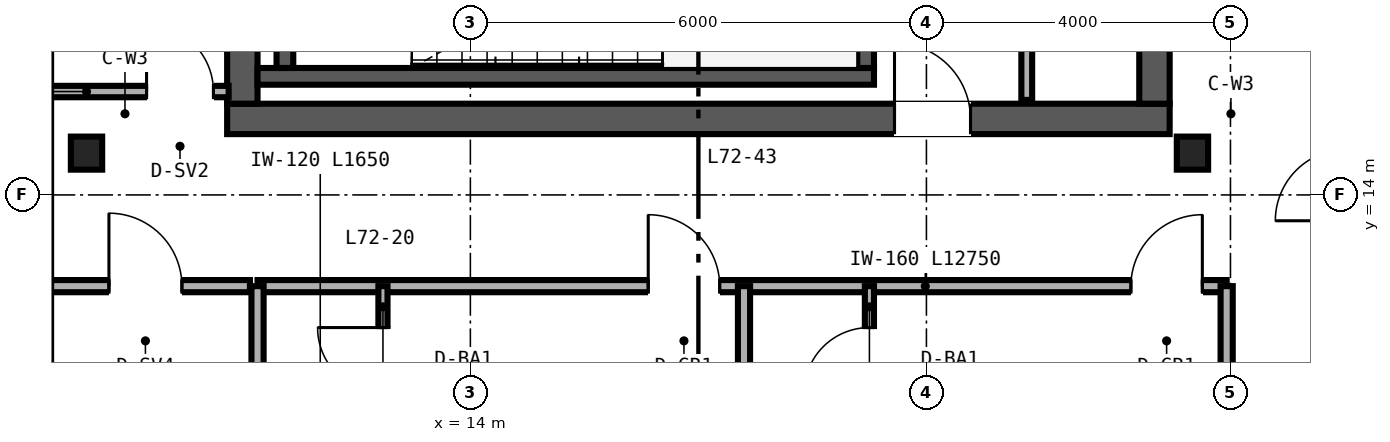
"""IFC4 building model, lengths in metres.
Left out: names, types, materials, properties, quantities, classifications, styles, units other than length and angle.
Written with IfcOpenShell. Run it as: python <this file> out.ifc"""

import sys

from ifc_helpers import new_model, si_unit, direction, frame, frame_2d, origin, origin_2d, place, context, subcontext, project, spatial, rectangle, i_section, extrude, source, transform, mapped, element, fill, save


model = new_model("IFC4")
c1 = context("Model", 3, precision=1e-05, world=origin(), true_north=direction((0.0, 1.0)))
c2 = subcontext(c1, "Body", "Model", "MODEL_VIEW")
j1 = project(units=[si_unit("LENGTHUNIT", "METRE"), si_unit("PLANEANGLEUNIT", "RADIAN")], contexts=[c1])
p1 = place(None, origin())
s1 = spatial("IfcSite", under=j1, at=p1, CompositionType="ELEMENT")
p2 = place(p1, origin())
s2 = spatial("IfcBuilding", under=s1, at=p2, CompositionType="ELEMENT")
p3 = place(p2, frame((0.0, 0.0, 283.2)))
s3 = spatial("IfcBuildingStorey", under=s2, at=p3, CompositionType="ELEMENT", Elevation=283.2)
p4 = place(p3, frame((10.8, 15.0, 0.0), z_axis=(0.0, 0.0, 1.0), x_axis=(1.0, 0.0, 0.0)))
e1 = element("IfcWall", 1, at=p4, inside=s3, PredefinedType="SHEAR", context=c2, shape_type="SweptSolid", body=[
    extrude(rectangle(XDim=12.4, YDim=0.4, at=frame_2d((6.2, 0.0))), origin(), (0.0, 0.0, 1.0), 3.38),
])
p5 = place(p4, frame((8.78, 0.0, 0.0)))
e2 = element("IfcOpeningElement", 2, at=p5, cuts=e1, PredefinedType="OPENING", context=c2, shape_type="SweptSolid", body=[
    extrude(rectangle(XDim=1.0, YDim=2.15, at=frame_2d((0.5, 1.075))), frame((0.0, 0.21, 0.0), z_axis=(0.0, -1.0, 0.0), x_axis=(1.0, 0.0, 0.0)), (0.0, 0.0, 1.0), 0.42),
])
for number, where, z_axis, x_axis in (
    (3, (11.0, 15.2, 0.0), (0.0, 0.0, 1.0), (0.0, 1.0, 0.0)),
    (4, (23.0, 15.2, 0.0), (0.0, 0.0, 1.0), (0.0, 1.0, 0.0)),
):
    element("IfcWall", number, at=place(p3, frame(where, z_axis=z_axis, x_axis=x_axis)), inside=s3, PredefinedType="SHEAR", context=c2, shape_type="SweptSolid", body=[
        extrude(rectangle(XDim=21.6, YDim=0.4, at=frame_2d((10.8, 0.0))), origin(), (0.0, 0.0, 1.0), 3.38),
    ])
p6 = place(p3, frame((11.2, 15.56, 0.0), z_axis=(0.0, 0.0, 1.0), x_axis=(1.0, 0.0, 0.0)))
e5 = element("IfcWall", 5, at=p6, inside=s3, PredefinedType="SHEAR", context=c2, shape_type="SweptSolid", body=[
    extrude(rectangle(XDim=8.11, YDim=0.22, at=frame_2d((4.055, 0.0))), origin(), (0.0, 0.0, 1.0), 3.4),
])
for number, where, z_axis, x_axis in (
    (6, (11.56, 15.67, 0.0), (0.0, 0.0, 1.0), (0.0, 1.0, 0.0)),
    (7, (19.2, 15.67, 0.0), (0.0, 0.0, 1.0), (0.0, 1.0, 0.0)),
):
    element("IfcWall", number, at=place(p3, frame(where, z_axis=z_axis, x_axis=x_axis)), inside=s3, PredefinedType="SHEAR", context=c2, shape_type="SweptSolid", body=[
        extrude(rectangle(XDim=3.28, YDim=0.22, at=frame_2d((1.64, 0.0))), origin(), (0.0, 0.0, 1.0), 3.4),
    ])
m1 = source(origin(), c2, "Body", "SweptSolid", [
    extrude(i_section(OverallWidth=0.412, OverallDepth=0.435, WebThickness=0.036, FlangeThickness=0.057, FilletRadius=0.025, at=origin_2d()), origin(), (0.0, 0.0, 1.0), 3.38),
])
for number, where, z_axis, x_axis in (
    (8, (8.95, 14.55, 0.0), (0.0, 0.0, 1.0), (1.0, 0.0, 0.0)),
    (9, (23.5, 14.55, 0.0), (0.0, 0.0, 1.0), (1.0, 0.0, 0.0)),
):
    element("IfcColumn", number, at=place(p3, frame(where, z_axis=z_axis, x_axis=x_axis)), inside=s3, PredefinedType="COLUMN", context=c2, shape_type="MappedRepresentation", body=[
        mapped(m1, transform((0.0, 0.0, 0.0), scale=1.0)),
    ])
p7 = place(p3, frame((21.32, 15.25, 0.0), z_axis=(0.0, 0.0, 1.0), x_axis=(0.0, 1.0, 0.0)))
e10 = element("IfcWall", 10, at=p7, inside=s3, PredefinedType="PARTITIONING", context=c2, shape_type="SweptSolid", body=[
    extrude(rectangle(XDim=3.59, YDim=0.142, at=frame_2d((1.795, 0.0))), origin(), (0.0, 0.0, 1.0), 3.38),
])
p8 = place(p7, frame((1.25, 0.0, 0.0)))
e11 = element("IfcOpeningElement", 11, at=p8, cuts=e10, PredefinedType="OPENING", context=c2, shape_type="SweptSolid", body=[
    extrude(rectangle(XDim=0.84, YDim=2.1, at=frame_2d((0.42, 1.05))), frame((0.0, 0.081, 0.0), z_axis=(0.0, -1.0, 0.0), x_axis=(1.0, 0.0, 0.0)), (0.0, 0.0, 1.0), 0.162),
])
p9 = place(p3, frame((11.2, 12.8, 0.0), z_axis=(0.0, 0.0, 1.0), x_axis=(1.0, 0.0, 0.0)))
e12 = element("IfcWall", 12, at=p9, inside=s3, PredefinedType="PARTITIONING", context=c2, shape_type="SweptSolid", body=[
    extrude(rectangle(XDim=12.75, YDim=0.16, at=frame_2d((6.375, 0.0))), origin(), (0.0, 0.0, 1.0), 3.38),
])
p10 = place(p9, frame((5.14, 0.0, 0.0)))
e13 = element("IfcOpeningElement", 13, at=p10, cuts=e12, PredefinedType="OPENING", context=c2, shape_type="SweptSolid", body=[
    extrude(rectangle(XDim=0.94, YDim=2.15, at=frame_2d((0.47, 1.075))), frame((0.0, 0.09, 0.0), z_axis=(0.0, -1.0, 0.0), x_axis=(1.0, 0.0, 0.0)), (0.0, 0.0, 1.0), 0.18),
])
p11 = place(p9, frame((11.49, 0.0, 0.0)))
e14 = element("IfcOpeningElement", 14, at=p11, cuts=e12, PredefinedType="OPENING", context=c2, shape_type="SweptSolid", body=[
    extrude(rectangle(XDim=0.94, YDim=2.15, at=frame_2d((0.47, 1.075))), frame((0.0, 0.09, 0.0), z_axis=(0.0, -1.0, 0.0), x_axis=(1.0, 0.0, 0.0)), (0.0, 0.0, 1.0), 0.18),
])
p12 = place(p3, frame((11.2, 9.26, 0.0), z_axis=(0.0, 0.0, 1.0), x_axis=(0.0, 1.0, 0.0)))
e15 = element("IfcWall", 15, at=p12, inside=s3, PredefinedType="PARTITIONING", context=c2, shape_type="SweptSolid", body=[
    extrude(rectangle(XDim=3.54, YDim=0.16, at=frame_2d((1.77, 0.0))), origin(), (0.0, 0.0, 1.0), 3.38),
])
p13 = place(p3, frame((23.95, 8.36, 0.0), z_axis=(0.0, 0.0, 1.0), x_axis=(0.0, 1.0, 0.0)))
e16 = element("IfcWall", 16, at=p13, inside=s3, PredefinedType="PARTITIONING", context=c2, shape_type="SweptSolid", body=[
    extrude(rectangle(XDim=4.44, YDim=0.16, at=frame_2d((2.22, 0.0))), origin(), (0.0, 0.0, 1.0), 3.38),
])
p14 = place(p3, frame((17.6, 8.36, 0.0), z_axis=(0.0, 0.0, 1.0), x_axis=(0.0, 1.0, 0.0)))
e17 = element("IfcWall", 17, at=p14, inside=s3, PredefinedType="PARTITIONING", context=c2, shape_type="SweptSolid", body=[
    extrude(rectangle(XDim=4.44, YDim=0.16, at=frame_2d((2.22, 0.0))), origin(), (0.0, 0.0, 1.0), 2.687),
])
p15 = place(p3, frame((12.85, 10.85, 0.0), z_axis=(0.0, 0.0, 1.0), x_axis=(0.0, 1.0, 0.0)))
e18 = element("IfcWall", 18, at=p15, inside=s3, PredefinedType="PARTITIONING", context=c2, shape_type="SweptSolid", body=[
    extrude(rectangle(XDim=1.95, YDim=0.12, at=frame_2d((0.975, 0.0))), origin(), (0.0, 0.0, 1.0), 3.38),
])
p16 = place(p15, frame((0.545, 0.0, 0.0)))
e19 = element("IfcOpeningElement", 19, at=p16, cuts=e18, PredefinedType="OPENING", context=c2, shape_type="SweptSolid", body=[
    extrude(rectangle(XDim=0.86, YDim=2.1, at=frame_2d((0.43, 1.05))), frame((0.0, 0.07, 0.0), z_axis=(0.0, -1.0, 0.0), x_axis=(1.0, 0.0, 0.0)), (0.0, 0.0, 1.0), 0.14),
])
p17 = place(p3, frame((19.25, 10.85, 0.0), z_axis=(0.0, 0.0, 1.0), x_axis=(0.0, 1.0, 0.0)))
e20 = element("IfcWall", 20, at=p17, inside=s3, PredefinedType="PARTITIONING", context=c2, shape_type="SweptSolid", body=[
    extrude(rectangle(XDim=1.95, YDim=0.12, at=frame_2d((0.975, 0.0))), origin(), (0.0, 0.0, 1.0), 3.38),
])
p18 = place(p17, frame((0.545, 0.0, 0.0)))
e21 = element("IfcOpeningElement", 21, at=p18, cuts=e20, PredefinedType="OPENING", context=c2, shape_type="SweptSolid", body=[
    extrude(rectangle(XDim=0.86, YDim=2.1, at=frame_2d((0.43, 1.05))), frame((0.0, 0.07, 0.0), z_axis=(0.0, -1.0, 0.0), x_axis=(1.0, 0.0, 0.0)), (0.0, 0.0, 1.0), 0.14),
])
p19 = place(p3, frame((8.16, 15.36, 0.0), z_axis=(0.0, 0.0, 1.0), x_axis=(1.0, 0.0, 0.0)))
e22 = element("IfcWall", 22, at=p19, inside=s3, PredefinedType="PARTITIONING", context=c2, shape_type="SweptSolid", body=[
    extrude(rectangle(XDim=2.66, YDim=0.15, at=frame_2d((1.33, 0.0))), origin(), (0.0, 0.0, 1.0), 2.601),
])
p20 = place(p19, frame((1.58, 0.0, 0.0)))
e23 = element("IfcOpeningElement", 23, at=p20, cuts=e22, PredefinedType="OPENING", context=c2, shape_type="SweptSolid", body=[
    extrude(rectangle(XDim=0.88, YDim=2.15, at=frame_2d((0.44, 1.075))), frame((0.0, 0.085, 0.0), z_axis=(0.0, -1.0, 0.0), x_axis=(1.0, 0.0, 0.0)), (0.0, 0.0, 1.0), 0.17),
])
p21 = place(p3, frame((8.35, 12.8, 0.0), z_axis=(0.0, 0.0, 1.0), x_axis=(1.0, 0.0, 0.0)))
e24 = element("IfcWall", 24, at=p21, inside=s3, PredefinedType="PARTITIONING", context=c2, shape_type="SweptSolid", body=[
    extrude(rectangle(XDim=2.75, YDim=0.16, at=frame_2d((1.375, 0.0))), origin(), (0.0, 0.0, 1.0), 3.38),
])
p22 = place(p21, frame((0.895, 0.0, 0.0)))
e25 = element("IfcOpeningElement", 25, at=p22, cuts=e24, PredefinedType="OPENING", context=c2, shape_type="SweptSolid", body=[
    extrude(rectangle(XDim=0.96, YDim=2.15, at=frame_2d((0.48, 1.075))), frame((0.0, 0.09, 0.0), z_axis=(0.0, -1.0, 0.0), x_axis=(1.0, 0.0, 0.0)), (0.0, 0.0, 1.0), 0.18),
])
m2 = source(origin(), c2, "Body", "SweptSolid", [
    extrude(rectangle(XDim=1.0, YDim=2.15, at=frame_2d((0.5, 1.075))), frame((0.0, 0.025, 0.0), z_axis=(0.0, -1.0, 0.0), x_axis=(1.0, 0.0, 0.0)), (0.0, 0.0, 1.0), 0.05),
])
p23 = place(p5, origin())
e26 = element("IfcDoor", 26, at=p23, inside=s3, OperationType="SINGLE_SWING_LEFT", PredefinedType="DOOR", context=c2, shape_type="MappedRepresentation", body=[
    mapped(m2, transform((0.0, 0.0, 0.0), scale=1.0)),
])
fill(e2, e26)
m3 = source(origin(), c2, "Body", "SweptSolid", [
    extrude(rectangle(XDim=0.86, YDim=2.1, at=frame_2d((0.43, 1.05))), frame((0.0, 0.025, 0.0), z_axis=(0.0, -1.0, 0.0), x_axis=(1.0, 0.0, 0.0)), (0.0, 0.0, 1.0), 0.05),
])
p24 = place(p16, origin())
e27 = element("IfcDoor", 27, at=p24, inside=s3, OperationType="SINGLE_SWING_RIGHT", PredefinedType="DOOR", context=c2, shape_type="MappedRepresentation", body=[
    mapped(m3, transform((0.0, 0.0, 0.0), scale=1.0)),
])
fill(e19, e27)
p25 = place(p18, origin())
e28 = element("IfcDoor", 28, at=p25, inside=s3, OperationType="SINGLE_SWING_LEFT", PredefinedType="DOOR", context=c2, shape_type="MappedRepresentation", body=[
    mapped(m3, transform((0.0, 0.0, 0.0), scale=1.0)),
])
fill(e21, e28)
m4 = source(origin(), c2, "Body", "SweptSolid", [
    extrude(rectangle(XDim=0.94, YDim=2.15, at=frame_2d((0.47, 1.075))), frame((0.0, 0.025, 0.0), z_axis=(0.0, -1.0, 0.0), x_axis=(1.0, 0.0, 0.0)), (0.0, 0.0, 1.0), 0.05),
])
p26 = place(p10, origin())
e29 = element("IfcDoor", 29, at=p26, inside=s3, OperationType="SINGLE_SWING_LEFT", PredefinedType="DOOR", context=c2, shape_type="MappedRepresentation", body=[
    mapped(m4, transform((0.0, 0.0, 0.0), scale=1.0)),
])
fill(e13, e29)
p27 = place(p11, origin())
e30 = element("IfcDoor", 30, at=p27, inside=s3, OperationType="SINGLE_SWING_RIGHT", PredefinedType="DOOR", context=c2, shape_type="MappedRepresentation", body=[
    mapped(m4, transform((0.0, 0.0, 0.0), scale=1.0)),
])
fill(e14, e30)
m5 = source(origin(), c2, "Body", "SweptSolid", [
    extrude(rectangle(XDim=0.88, YDim=2.15, at=frame_2d((0.44, 1.075))), frame((0.0, 0.025, 0.0), z_axis=(0.0, -1.0, 0.0), x_axis=(1.0, 0.0, 0.0)), (0.0, 0.0, 1.0), 0.05),
])
p28 = place(p20, origin())
e31 = element("IfcDoor", 31, at=p28, inside=s3, OperationType="SINGLE_SWING_LEFT", PredefinedType="DOOR", context=c2, shape_type="MappedRepresentation", body=[
    mapped(m5, transform((0.0, 0.0, 0.0), scale=1.0)),
])
fill(e23, e31)
m6 = source(origin(), c2, "Body", "SweptSolid", [
    extrude(rectangle(XDim=0.96, YDim=2.15, at=frame_2d((0.48, 1.075))), frame((0.0, 0.025, 0.0), z_axis=(0.0, -1.0, 0.0), x_axis=(1.0, 0.0, 0.0)), (0.0, 0.0, 1.0), 0.05),
])
p29 = place(p22, origin())
e32 = element("IfcDoor", 32, at=p29, inside=s3, OperationType="SINGLE_SWING_LEFT", PredefinedType="DOOR", context=c2, shape_type="MappedRepresentation", body=[
    mapped(m6, transform((0.0, 0.0, 0.0), scale=1.0)),
])
fill(e25, e32)
save(model, sys.argv[1])
